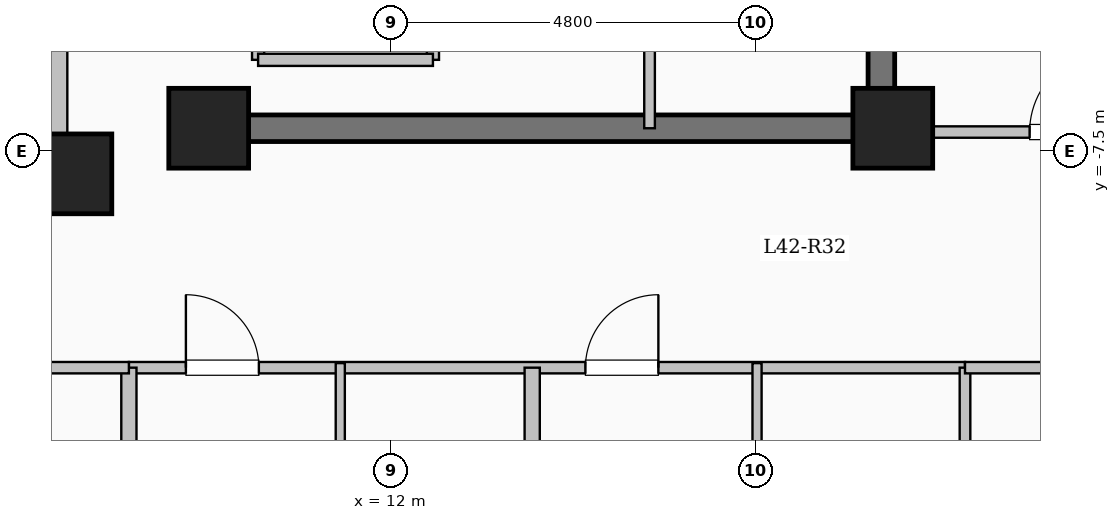
"""IFC4 building model, lengths in metres.
Left out: names, types, materials, properties, quantities, classifications, styles, units other than length and angle.
Written with IfcOpenShell. Run it as: python <this file> out.ifc"""

import sys

from ifc_helpers import new_model, si_unit, direction, frame, frame_2d, origin, origin_2d, place, context, subcontext, project, spatial, rectangle, extrude, element, fill, save


model = new_model("IFC4")
c1 = context("Model", 3, precision=1e-05, world=origin(), true_north=direction((0.0, 1.0)))
c2 = subcontext(c1, "Body", "Model", "MODEL_VIEW")
j1 = project(units=[si_unit("LENGTHUNIT", "METRE"), si_unit("PLANEANGLEUNIT", "RADIAN")], contexts=[c1])
p1 = place(None, origin())
s1 = spatial("IfcSite", under=j1, at=p1, CompositionType="ELEMENT")
p2 = place(p1, origin())
s2 = spatial("IfcBuilding", under=s1, at=p2, CompositionType="ELEMENT")
p3 = place(p2, frame((0.0, 0.0, 156.05)))
s3 = spatial("IfcBuildingStorey", under=s2, at=p3, CompositionType="ELEMENT", Elevation=156.05)
for number, where, z_axis, x_axis in (
    (1, (7.8, -7.8, 0.0), (0.0, 0.0, 1.0), (1.0, 0.0, 0.0)),
    (2, (9.6, -7.2, 0.0), (0.0, 0.0, 1.0), (1.0, 0.0, 0.0)),
    (3, (18.6, -7.2, 0.0), (0.0, 0.0, 1.0), (1.0, 0.0, 0.0)),
):
    element("IfcColumn", number, at=place(p3, frame(where, z_axis=z_axis, x_axis=x_axis)), inside=s3, PredefinedType="COLUMN", context=c2, shape_type="SweptSolid", body=[
        extrude(rectangle(XDim=1.05, YDim=1.05, at=origin_2d()), origin(), (0.0, 0.0, 1.0), 3.35),
    ])
p4 = place(p3, frame((-7.62, -7.62, 0.0), z_axis=(0.0, 0.0, 1.0), x_axis=(1.0, 0.0, 0.0)))
e4 = element("IfcWall", 4, at=p4, inside=s3, PredefinedType="SOLIDWALL", context=c2, shape_type="SweptSolid", body=[
    extrude(rectangle(XDim=15.24, YDim=0.24, at=frame_2d((7.62, 0.0))), origin(), (0.0, 0.0, 1.0), 3.1),
])
p5 = place(p4, frame((6.92, 0.0, 0.95)))
e5 = element("IfcOpeningElement", 5, at=p5, cuts=e4, PredefinedType="OPENING", context=c2, shape_type="SweptSolid", body=[
    extrude(rectangle(XDim=1.4, YDim=1.5, at=frame_2d((0.7, 0.75))), frame((0.0, 0.13, 0.0), z_axis=(0.0, -1.0, 0.0), x_axis=(1.0, 0.0, 0.0)), (0.0, 0.0, 1.0), 0.26),
])
p6 = place(p3, frame((7.62, -7.62, 0.0), z_axis=(0.0, 0.0, 1.0), x_axis=(0.0, 1.0, 0.0)))
e6 = element("IfcWall", 6, at=p6, inside=s3, PredefinedType="SOLIDWALL", context=c2, shape_type="SweptSolid", body=[
    extrude(rectangle(XDim=15.24, YDim=0.24, at=frame_2d((7.62, 0.0))), origin(), (0.0, 0.0, 1.0), 3.1),
])
p7 = place(p6, frame((6.92, 0.0, 0.95)))
e7 = element("IfcOpeningElement", 7, at=p7, cuts=e6, PredefinedType="OPENING", context=c2, shape_type="SweptSolid", body=[
    extrude(rectangle(XDim=1.4, YDim=1.5, at=frame_2d((0.7, 0.75))), frame((0.0, 0.13, 0.0), z_axis=(0.0, -1.0, 0.0), x_axis=(1.0, 0.0, 0.0)), (0.0, 0.0, 1.0), 0.26),
])
p8 = place(p3, frame((10.25, -6.3, 0.0), z_axis=(0.0, 0.0, 1.0), x_axis=(0.0, 1.0, 0.0)))
e8 = element("IfcWall", 8, at=p8, inside=s3, PredefinedType="SOLIDWALL", context=c2, shape_type="SweptSolid", body=[
    extrude(rectangle(XDim=2.6, YDim=0.16, at=frame_2d((1.3, 0.0))), origin(), (0.0, 0.0, 1.0), 3.1),
])
p9 = place(p8, frame((0.75, 0.0, 0.0)))
e9 = element("IfcOpeningElement", 9, at=p9, cuts=e8, PredefinedType="OPENING", context=c2, shape_type="SweptSolid", body=[
    extrude(rectangle(XDim=1.1, YDim=2.15, at=frame_2d((0.55, 1.075))), frame((0.0, 0.09, 0.0), z_axis=(0.0, -1.0, 0.0), x_axis=(1.0, 0.0, 0.0)), (0.0, 0.0, 1.0), 0.18),
])
p10 = place(p3, frame((12.55, -6.3, 0.0), z_axis=(0.0, 0.0, 1.0), x_axis=(0.0, 1.0, 0.0)))
e10 = element("IfcWall", 10, at=p10, inside=s3, PredefinedType="SOLIDWALL", context=c2, shape_type="SweptSolid", body=[
    extrude(rectangle(XDim=2.6, YDim=0.16, at=frame_2d((1.3, 0.0))), origin(), (0.0, 0.0, 1.0), 3.1),
])
p11 = place(p3, frame((10.25, -6.3, 0.0), z_axis=(0.0, 0.0, 1.0), x_axis=(1.0, 0.0, 0.0)))
e11 = element("IfcWall", 11, at=p11, inside=s3, PredefinedType="SOLIDWALL", context=c2, shape_type="SweptSolid", body=[
    extrude(rectangle(XDim=2.3, YDim=0.16, at=frame_2d((1.15, 0.0))), origin(), (0.0, 0.0, 1.0), 3.1),
])
p12 = place(p3, frame((18.45, -7.375, 0.0), z_axis=(0.0, 0.0, 1.0), x_axis=(0.0, 1.0, 0.0)))
e12 = element("IfcWall", 12, at=p12, inside=s3, PredefinedType="SHEAR", context=c2, shape_type="SweptSolid", body=[
    extrude(rectangle(XDim=14.05, YDim=0.35, at=frame_2d((7.025, 0.0))), origin(), (0.0, 0.0, 1.0), 3.35),
])
p13 = place(p3, frame((10.075, -7.2, 0.0), z_axis=(0.0, 0.0, 1.0), x_axis=(1.0, 0.0, 0.0)))
e13 = element("IfcWall", 13, at=p13, inside=s3, PredefinedType="SHEAR", context=c2, shape_type="SweptSolid", body=[
    extrude(rectangle(XDim=8.55, YDim=0.35, at=frame_2d((4.275, 0.0))), origin(), (0.0, 0.0, 1.0), 3.35),
])
p14 = place(p3, frame((15.4, -7.2, 0.0), z_axis=(0.0, 0.0, 1.0), x_axis=(0.0, 1.0, 0.0)))
e14 = element("IfcWall", 14, at=p14, inside=s3, PredefinedType="PARTITIONING", context=c2, shape_type="SweptSolid", body=[
    extrude(rectangle(XDim=10.45, YDim=0.14, at=frame_2d((5.225, 0.0))), origin(), (0.0, 0.0, 1.0), 3.1),
])
p15 = place(p14, frame((9.25, 0.0, 0.0)))
e15 = element("IfcOpeningElement", 15, at=p15, cuts=e14, PredefinedType="OPENING", context=c2, shape_type="SweptSolid", body=[
    extrude(rectangle(XDim=0.9, YDim=2.08, at=frame_2d((0.45, 1.04))), frame((0.0, 0.08, 0.0), z_axis=(0.0, -1.0, 0.0), x_axis=(1.0, 0.0, 0.0)), (0.0, 0.0, 1.0), 0.16),
])
p16 = place(p3, frame((8.55, -10.35, 0.0), z_axis=(0.0, 0.0, 1.0), x_axis=(1.0, 0.0, 0.0)))
e16 = element("IfcWall", 16, at=p16, inside=s3, PredefinedType="PARTITIONING", context=c2, shape_type="SweptSolid", body=[
    extrude(rectangle(XDim=11.0, YDim=0.15, at=frame_2d((5.5, 0.0))), origin(), (0.0, 0.0, 1.0), 3.1),
])
p17 = place(p16, frame((0.75, 0.0, 0.0)))
e17 = element("IfcOpeningElement", 17, at=p17, cuts=e16, PredefinedType="OPENING", context=c2, shape_type="SweptSolid", body=[
    extrude(rectangle(XDim=0.96, YDim=2.15, at=frame_2d((0.48, 1.075))), frame((0.0, 0.085, 0.0), z_axis=(0.0, -1.0, 0.0), x_axis=(1.0, 0.0, 0.0)), (0.0, 0.0, 1.0), 0.17),
])
p18 = place(p16, frame((6.006, 0.0, 0.0)))
e18 = element("IfcOpeningElement", 18, at=p18, cuts=e16, PredefinedType="OPENING", context=c2, shape_type="SweptSolid", body=[
    extrude(rectangle(XDim=0.96, YDim=2.15, at=frame_2d((0.48, 1.075))), frame((0.0, 0.085, 0.0), z_axis=(0.0, -1.0, 0.0), x_axis=(1.0, 0.0, 0.0)), (0.0, 0.0, 1.0), 0.17),
])
p19 = place(p3, frame((13.856, -21.2, 0.0), z_axis=(0.0, 0.0, 1.0), x_axis=(0.0, 1.0, 0.0)))
e19 = element("IfcWall", 19, at=p19, inside=s3, PredefinedType="SOLIDWALL", context=c2, shape_type="SweptSolid", body=[
    extrude(rectangle(XDim=10.85, YDim=0.2, at=frame_2d((5.425, 0.0))), origin(), (0.0, 0.0, 1.0), 3.1),
])
p20 = place(p3, frame((11.331, -13.51, 0.0), z_axis=(0.0, 0.0, 1.0), x_axis=(0.0, 1.0, 0.0)))
e20 = element("IfcWall", 20, at=p20, inside=s3, PredefinedType="PARTITIONING", context=c2, shape_type="SweptSolid", body=[
    extrude(rectangle(XDim=3.22, YDim=0.12, at=frame_2d((1.61, 0.0))), origin(), (0.0, 0.0, 1.0), 3.1),
])
p21 = place(p20, frame((1.14, 0.0, 0.0)))
e21 = element("IfcOpeningElement", 21, at=p21, cuts=e20, PredefinedType="OPENING", context=c2, shape_type="SweptSolid", body=[
    extrude(rectangle(XDim=0.88, YDim=2.1, at=frame_2d((0.44, 1.05))), frame((0.0, 0.07, 0.0), z_axis=(0.0, -1.0, 0.0), x_axis=(1.0, 0.0, 0.0)), (0.0, 0.0, 1.0), 0.14),
])
p22 = place(p3, frame((16.814, -13.51, 0.0), z_axis=(0.0, 0.0, 1.0), x_axis=(0.0, 1.0, 0.0)))
e22 = element("IfcWall", 22, at=p22, inside=s3, PredefinedType="PARTITIONING", context=c2, shape_type="SweptSolid", body=[
    extrude(rectangle(XDim=3.22, YDim=0.12, at=frame_2d((1.61, 0.0))), origin(), (0.0, 0.0, 1.0), 3.1),
])
p23 = place(p22, frame((1.14, 0.0, 0.0)))
e23 = element("IfcOpeningElement", 23, at=p23, cuts=e22, PredefinedType="OPENING", context=c2, shape_type="SweptSolid", body=[
    extrude(rectangle(XDim=0.88, YDim=2.1, at=frame_2d((0.44, 1.05))), frame((0.0, 0.07, 0.0), z_axis=(0.0, -1.0, 0.0), x_axis=(1.0, 0.0, 0.0)), (0.0, 0.0, 1.0), 0.14),
])
p24 = place(p3, frame((8.55, -21.804, 0.0), z_axis=(0.0, 0.0, 1.0), x_axis=(0.0, 1.0, 0.0)))
e24 = element("IfcWall", 24, at=p24, inside=s3, PredefinedType="SOLIDWALL", context=c2, shape_type="SweptSolid", body=[
    extrude(rectangle(XDim=11.454, YDim=0.2, at=frame_2d((5.727, 0.0))), origin(), (0.0, 0.0, 1.0), 3.1),
])
p25 = place(p3, frame((-8.55, -10.35, 0.0), z_axis=(0.0, 0.0, 1.0), x_axis=(1.0, 0.0, 0.0)))
e25 = element("IfcWall", 25, at=p25, inside=s3, PredefinedType="PARTITIONING", context=c2, shape_type="SweptSolid", body=[
    extrude(rectangle(XDim=17.1, YDim=0.15, at=frame_2d((8.55, 0.0))), origin(), (0.0, 0.0, 1.0), 3.1),
])
p26 = place(p25, frame((1.6, 0.0, 0.0)))
e26 = element("IfcOpeningElement", 26, at=p26, cuts=e25, PredefinedType="OPENING", context=c2, shape_type="SweptSolid", body=[
    extrude(rectangle(XDim=0.95, YDim=2.15, at=frame_2d((0.475, 1.075))), frame((0.0, 0.085, 0.0), z_axis=(0.0, -1.0, 0.0), x_axis=(1.0, 0.0, 0.0)), (0.0, 0.0, 1.0), 0.17),
])
p27 = place(p25, frame((10.5, 0.0, 0.0)))
e27 = element("IfcOpeningElement", 27, at=p27, cuts=e25, PredefinedType="OPENING", context=c2, shape_type="SweptSolid", body=[
    extrude(rectangle(XDim=0.95, YDim=2.15, at=frame_2d((0.475, 1.075))), frame((0.0, 0.085, 0.0), z_axis=(0.0, -1.0, 0.0), x_axis=(1.0, 0.0, 0.0)), (0.0, 0.0, 1.0), 0.17),
])
p28 = place(p3, frame((18.45, -7.25, 0.0), z_axis=(0.0, 0.0, 1.0), x_axis=(1.0, 0.0, 0.0)))
e28 = element("IfcWall", 28, at=p28, inside=s3, PredefinedType="PARTITIONING", context=c2, shape_type="SweptSolid", body=[
    extrude(rectangle(XDim=6.63, YDim=0.15, at=frame_2d((3.315, 0.0))), origin(), (0.0, 0.0, 1.0), 3.1),
])
p29 = place(p28, frame((1.95, 0.0, 0.0)))
e29 = element("IfcOpeningElement", 29, at=p29, cuts=e28, PredefinedType="OPENING", context=c2, shape_type="SweptSolid", body=[
    extrude(rectangle(XDim=1.08, YDim=2.15, at=frame_2d((0.54, 1.075))), frame((0.0, 0.085, 0.0), z_axis=(0.0, -1.0, 0.0), x_axis=(1.0, 0.0, 0.0)), (0.0, 0.0, 1.0), 0.17),
])
p30 = place(p3, frame((19.55, -17.25, 0.0), z_axis=(0.0, 0.0, 1.0), x_axis=(0.0, 1.0, 0.0)))
e30 = element("IfcWall", 30, at=p30, inside=s3, PredefinedType="PARTITIONING", context=c2, shape_type="SweptSolid", body=[
    extrude(rectangle(XDim=6.9, YDim=0.14, at=frame_2d((3.45, 0.0))), origin(), (0.0, 0.0, 1.0), 3.1),
])
p31 = place(p3, frame((19.55, -10.35, 0.0), z_axis=(0.0, 0.0, 1.0), x_axis=(1.0, 0.0, 0.0)))
e31 = element("IfcWall", 31, at=p31, inside=s3, PredefinedType="PARTITIONING", context=c2, shape_type="SweptSolid", body=[
    extrude(rectangle(XDim=5.53, YDim=0.15, at=frame_2d((2.765, 0.0))), origin(), (0.0, 0.0, 1.0), 3.1),
])
p32 = place(p31, frame((2.29, 0.0, 0.0)))
e32 = element("IfcOpeningElement", 32, at=p32, cuts=e31, PredefinedType="OPENING", context=c2, shape_type="SweptSolid", body=[
    extrude(rectangle(XDim=0.95, YDim=2.15, at=frame_2d((0.475, 1.075))), frame((0.0, 0.085, 0.0), z_axis=(0.0, -1.0, 0.0), x_axis=(1.0, 0.0, 0.0)), (0.0, 0.0, 1.0), 0.17),
])
p33 = place(p17, origin())
e33 = element("IfcDoor", 33, at=p33, inside=s3, OperationType="SINGLE_SWING_LEFT", PredefinedType="DOOR", context=c2, shape_type="SweptSolid", body=[
    extrude(rectangle(XDim=0.96, YDim=2.15, at=frame_2d((0.48, 1.075))), frame((0.0, 0.025, 0.0), z_axis=(0.0, -1.0, 0.0), x_axis=(1.0, 0.0, 0.0)), (0.0, 0.0, 1.0), 0.05),
])
fill(e17, e33)
p34 = place(p18, origin())
e34 = element("IfcDoor", 34, at=p34, inside=s3, OperationType="SINGLE_SWING_RIGHT", PredefinedType="DOOR", context=c2, shape_type="SweptSolid", body=[
    extrude(rectangle(XDim=0.96, YDim=2.15, at=frame_2d((0.48, 1.075))), frame((0.0, 0.025, 0.0), z_axis=(0.0, -1.0, 0.0), x_axis=(1.0, 0.0, 0.0)), (0.0, 0.0, 1.0), 0.05),
])
fill(e18, e34)
p35 = place(p29, origin())
e35 = element("IfcDoor", 35, at=p35, inside=s3, OperationType="SINGLE_SWING_RIGHT", PredefinedType="DOOR", context=c2, shape_type="SweptSolid", body=[
    extrude(rectangle(XDim=1.08, YDim=2.15, at=frame_2d((0.54, 1.075))), frame((0.0, 0.025, 0.0), z_axis=(0.0, -1.0, 0.0), x_axis=(1.0, 0.0, 0.0)), (0.0, 0.0, 1.0), 0.05),
])
fill(e29, e35)
save(model, sys.argv[1])
